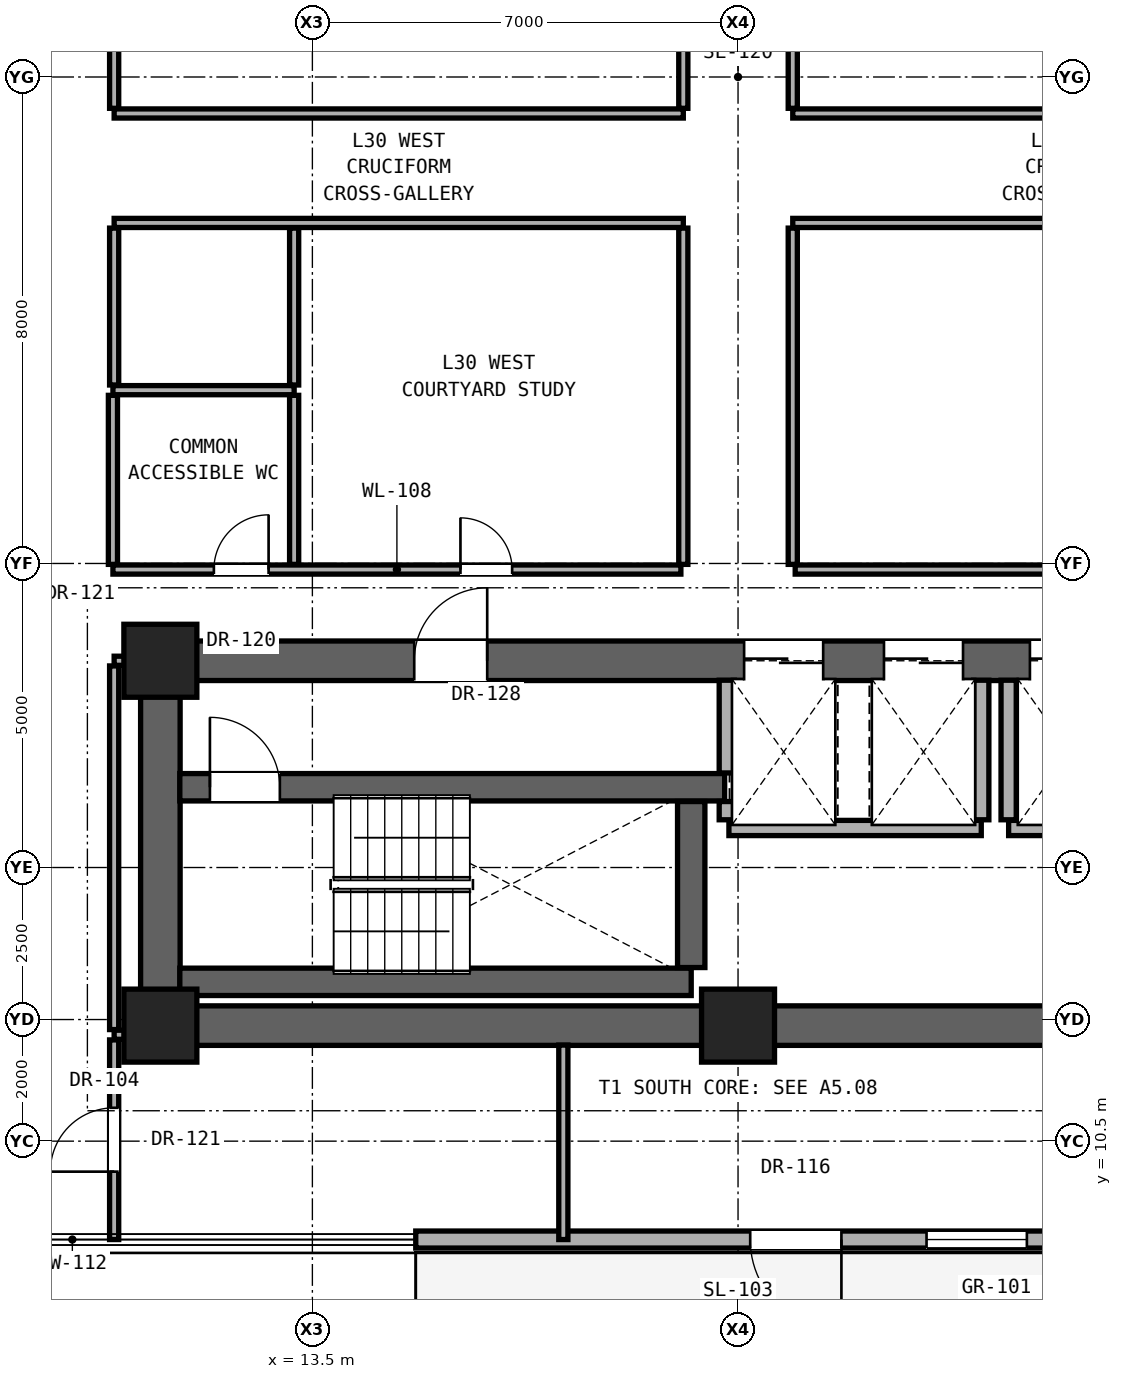
"""IFC4 building model, lengths in metres.
Left out: names, types, materials, properties, quantities, classifications, styles, units other than length and angle.
Written with IfcOpenShell. Run it as: python <this file> out.ifc"""

import sys

from ifc_helpers import new_model, si_unit, direction, frame, frame_2d, origin, origin_2d, place, context, subcontext, project, spatial, rectangle, extrude, element, fill, save


model = new_model("IFC4")
c1 = context("Model", 3, precision=1e-05, world=origin(), true_north=direction((0.0, 1.0)))
c2 = subcontext(c1, "Body", "Model", "MODEL_VIEW")
j1 = project(units=[si_unit("LENGTHUNIT", "METRE"), si_unit("PLANEANGLEUNIT", "RADIAN")], contexts=[c1])
p1 = place(None, origin())
s1 = spatial("IfcSite", under=j1, at=p1, CompositionType="ELEMENT")
p2 = place(p1, origin())
s2 = spatial("IfcBuilding", under=s1, at=p2, CompositionType="ELEMENT")
p3 = place(p2, frame((0.0, 0.0, 108.2)))
s3 = spatial("IfcBuildingStorey", under=s2, at=p3, CompositionType="ELEMENT", Elevation=108.2)
for number, where, z_axis, x_axis in (
    (1, (11.0, 12.4, 0.0), (0.0, 0.0, 1.0), (1.0, 0.0, 0.0)),
    (2, (20.5, 12.4, 0.0), (0.0, 0.0, 1.0), (1.0, 0.0, 0.0)),
    (3, (11.0, 18.4, 0.0), (0.0, 0.0, 1.0), (1.0, 0.0, 0.0)),
):
    element("IfcColumn", number, at=place(p3, frame(where, z_axis=z_axis, x_axis=x_axis)), inside=s3, PredefinedType="COLUMN", context=c2, shape_type="SweptSolid", body=[
        extrude(rectangle(XDim=1.2, YDim=1.2, at=origin_2d()), origin(), (0.0, 0.0, 1.0), 3.3),
    ])
p4 = place(p3, frame((11.0, 12.4, 0.0), z_axis=(0.0, 0.0, 1.0), x_axis=(1.0, 0.0, 0.0)))
e4 = element("IfcWall", 4, at=p4, inside=s3, PredefinedType="SHEAR", context=c2, shape_type="SweptSolid", body=[
    extrude(rectangle(XDim=19.0, YDim=0.65, at=frame_2d((9.5, 0.0))), origin(), (0.0, 0.0, 1.0), 3.08),
])
p5 = place(p3, frame((11.0, 12.4, 0.0), z_axis=(0.0, 0.0, 1.0), x_axis=(0.0, 1.0, 0.0)))
e5 = element("IfcWall", 5, at=p5, inside=s3, PredefinedType="SHEAR", context=c2, shape_type="SweptSolid", body=[
    extrude(rectangle(XDim=6.0, YDim=0.65, at=frame_2d((3.0, 0.0))), origin(), (0.0, 0.0, 1.0), 3.08),
])
p6 = place(p3, frame((11.0, 18.4, 0.0), z_axis=(0.0, 0.0, 1.0), x_axis=(1.0, 0.0, 0.0)))
e6 = element("IfcWall", 6, at=p6, inside=s3, PredefinedType="SHEAR", context=c2, shape_type="SweptSolid", body=[
    extrude(rectangle(XDim=19.0, YDim=0.65, at=frame_2d((9.5, 0.0))), origin(), (0.0, 0.0, 1.0), 3.08),
])
p7 = place(p6, frame((4.175, 0.0, 0.0)))
e7 = element("IfcOpeningElement", 7, at=p7, cuts=e6, PredefinedType="OPENING", context=c2, shape_type="SweptSolid", body=[
    extrude(rectangle(XDim=1.2, YDim=2.25, at=frame_2d((0.6, 1.125))), frame((0.0, 0.335, 0.0), z_axis=(0.0, -1.0, 0.0), x_axis=(1.0, 0.0, 0.0)), (0.0, 0.0, 1.0), 0.67),
])
p8 = place(p6, frame((9.6, 0.0, 0.0)))
e8 = element("IfcOpeningElement", 8, at=p8, cuts=e6, PredefinedType="OPENING", context=c2, shape_type="SweptSolid", body=[
    extrude(rectangle(XDim=1.3, YDim=2.3, at=frame_2d((0.65, 1.15))), frame((0.0, 0.335, 0.0), z_axis=(0.0, -1.0, 0.0), x_axis=(1.0, 0.0, 0.0)), (0.0, 0.0, 1.0), 0.67),
])
p9 = place(p6, frame((11.9, 0.0, 0.0)))
e9 = element("IfcOpeningElement", 9, at=p9, cuts=e6, PredefinedType="OPENING", context=c2, shape_type="SweptSolid", body=[
    extrude(rectangle(XDim=1.3, YDim=2.3, at=frame_2d((0.65, 1.15))), frame((0.0, 0.335, 0.0), z_axis=(0.0, -1.0, 0.0), x_axis=(1.0, 0.0, 0.0)), (0.0, 0.0, 1.0), 0.67),
])
p10 = place(p6, frame((14.3, 0.0, 0.0)))
e10 = element("IfcOpeningElement", 10, at=p10, cuts=e6, PredefinedType="OPENING", context=c2, shape_type="SweptSolid", body=[
    extrude(rectangle(XDim=1.3, YDim=2.3, at=frame_2d((0.65, 1.15))), frame((0.0, 0.335, 0.0), z_axis=(0.0, -1.0, 0.0), x_axis=(1.0, 0.0, 0.0)), (0.0, 0.0, 1.0), 0.67),
])
p11 = place(p6, frame((16.6, 0.0, 0.0)))
e11 = element("IfcOpeningElement", 11, at=p11, cuts=e6, PredefinedType="OPENING", context=c2, shape_type="SweptSolid", body=[
    extrude(rectangle(XDim=1.3, YDim=2.3, at=frame_2d((0.65, 1.15))), frame((0.0, 0.335, 0.0), z_axis=(0.0, -1.0, 0.0), x_axis=(1.0, 0.0, 0.0)), (0.0, 0.0, 1.0), 0.67),
])
p12 = place(p3, frame((25.8, 8.882, 0.0), z_axis=(0.0, 0.0, 1.0), x_axis=(-1.0, 0.0, 0.0)))
e12 = element("IfcWall", 12, at=p12, inside=s3, PredefinedType="SOLIDWALL", context=c2, shape_type="SweptSolid", body=[
    extrude(rectangle(XDim=10.6, YDim=0.28, at=frame_2d((5.3, 0.0))), origin(), (0.0, 0.0, 1.0), 3.04),
])
p13 = place(p12, frame((0.55, 0.0, 0.69)))
e13 = element("IfcOpeningElement", 13, at=p13, cuts=e12, PredefinedType="OPENING", context=c2, shape_type="SweptSolid", body=[
    extrude(rectangle(XDim=1.65, YDim=2.2, at=frame_2d((0.825, 1.1))), frame((0.0, 0.15, 0.0), z_axis=(0.0, -1.0, 0.0), x_axis=(1.0, 0.0, 0.0)), (0.0, 0.0, 1.0), 0.3),
])
p14 = place(p12, frame((3.6, 0.0, 0.0)))
e14 = element("IfcOpeningElement", 14, at=p14, cuts=e12, PredefinedType="OPENING", context=c2, shape_type="SweptSolid", body=[
    extrude(rectangle(XDim=1.5, YDim=2.3, at=frame_2d((0.75, 1.15))), frame((0.0, 0.15, 0.0), z_axis=(0.0, -1.0, 0.0), x_axis=(1.0, 0.0, 0.0)), (0.0, 0.0, 1.0), 0.3),
])
p15 = place(p3, frame((10.24, 12.25, 0.0), z_axis=(0.0, 0.0, 1.0), x_axis=(1.0, 0.0, 0.0)))
e15 = element("IfcWall", 15, at=p15, inside=s3, PredefinedType="PARTITIONING", context=c2, shape_type="SweptSolid", body=[
    extrude(rectangle(XDim=0.44, YDim=0.15, at=frame_2d((0.22, 0.0))), origin(), (0.0, 0.0, 1.0), 3.08),
])
p16 = place(p3, frame((11.32, 13.12, 0.0), z_axis=(0.0, 0.0, 1.0), x_axis=(1.0, 0.0, 0.0)))
e16 = element("IfcWall", 16, at=p16, inside=s3, PredefinedType="SHEAR", context=c2, shape_type="SweptSolid", body=[
    extrude(rectangle(XDim=8.41, YDim=0.45, at=frame_2d((4.205, 0.0))), origin(), (0.0, 0.0, 1.0), 3.08),
])
p17 = place(p3, frame((20.35, 15.65, 0.0), z_axis=(0.0, 0.0, 1.0), x_axis=(1.0, 0.0, 0.0)))
e17 = element("IfcWall", 17, at=p17, inside=s3, PredefinedType="SOLIDWALL", context=c2, shape_type="SweptSolid", body=[
    extrude(rectangle(XDim=4.15, YDim=0.25, at=frame_2d((2.075, 0.0))), origin(), (0.0, 0.0, 1.0), 3.08),
])
p18 = place(p3, frame((24.95, 15.65, 0.0), z_axis=(0.0, 0.0, 1.0), x_axis=(1.0, 0.0, 0.0)))
e18 = element("IfcWall", 18, at=p18, inside=s3, PredefinedType="SOLIDWALL", context=c2, shape_type="SweptSolid", body=[
    extrude(rectangle(XDim=4.25, YDim=0.25, at=frame_2d((2.125, 0.0))), origin(), (0.0, 0.0, 1.0), 3.08),
])
p19 = place(p3, frame((11.32, 16.32, 0.0), z_axis=(0.0, 0.0, 1.0), x_axis=(1.0, 0.0, 0.0)))
e19 = element("IfcWall", 19, at=p19, inside=s3, PredefinedType="SHEAR", context=c2, shape_type="SweptSolid", body=[
    extrude(rectangle(XDim=8.96, YDim=0.45, at=frame_2d((4.48, 0.0))), origin(), (0.0, 0.0, 1.0), 3.08),
])
p20 = place(p19, frame((0.495, 0.0, 0.0)))
e20 = element("IfcOpeningElement", 20, at=p20, cuts=e19, PredefinedType="OPENING", context=c2, shape_type="SweptSolid", body=[
    extrude(rectangle(XDim=1.15, YDim=2.2, at=frame_2d((0.575, 1.1))), frame((0.0, 0.235, 0.0), z_axis=(0.0, -1.0, 0.0), x_axis=(1.0, 0.0, 0.0)), (0.0, 0.0, 1.0), 0.47),
])
p21 = place(p3, frame((10.24, 18.4, 0.0), z_axis=(0.0, 0.0, 1.0), x_axis=(1.0, 0.0, 0.0)))
e21 = element("IfcWall", 21, at=p21, inside=s3, PredefinedType="PARTITIONING", context=c2, shape_type="SweptSolid", body=[
    extrude(rectangle(XDim=0.44, YDim=0.15, at=frame_2d((0.22, 0.0))), origin(), (0.0, 0.0, 1.0), 2.456),
])
p22 = place(p3, frame((10.22, 19.9, 0.0), z_axis=(0.0, 0.0, 1.0), x_axis=(1.0, 0.0, 0.0)))
e22 = element("IfcWall", 22, at=p22, inside=s3, PredefinedType="PARTITIONING", context=c2, shape_type="SweptSolid", body=[
    extrude(rectangle(XDim=9.34, YDim=0.15, at=frame_2d((4.67, 0.0))), origin(), (0.0, 0.0, 1.0), 2.124),
])
p23 = place(p22, frame((1.66, 0.0, 0.0)))
e23 = element("IfcOpeningElement", 23, at=p23, cuts=e22, PredefinedType="OPENING", context=c2, shape_type="SweptSolid", body=[
    extrude(rectangle(XDim=0.9, YDim=2.1, at=frame_2d((0.45, 1.05))), frame((0.0, 0.085, 0.0), z_axis=(0.0, -1.0, 0.0), x_axis=(1.0, 0.0, 0.0)), (0.0, 0.0, 1.0), 0.17),
])
p24 = place(p22, frame((5.715, 0.0, 0.0)))
e24 = element("IfcOpeningElement", 24, at=p24, cuts=e22, PredefinedType="OPENING", context=c2, shape_type="SweptSolid", body=[
    extrude(rectangle(XDim=0.85, YDim=2.01, at=frame_2d((0.425, 1.005))), frame((0.0, 0.085, 0.0), z_axis=(0.0, -1.0, 0.0), x_axis=(1.0, 0.0, 0.0)), (0.0, 0.0, 1.0), 0.17),
])
p25 = place(p3, frame((21.44, 19.9, 0.0), z_axis=(0.0, 0.0, 1.0), x_axis=(1.0, 0.0, 0.0)))
e25 = element("IfcWall", 25, at=p25, inside=s3, PredefinedType="PARTITIONING", context=c2, shape_type="SweptSolid", body=[
    extrude(rectangle(XDim=9.32, YDim=0.15, at=frame_2d((4.66, 0.0))), origin(), (0.0, 0.0, 1.0), 2.124),
])
p26 = place(p25, frame((4.235, 0.0, 0.0)))
e26 = element("IfcOpeningElement", 26, at=p26, cuts=e25, PredefinedType="OPENING", context=c2, shape_type="SweptSolid", body=[
    extrude(rectangle(XDim=0.85, YDim=2.01, at=frame_2d((0.425, 1.005))), frame((0.0, 0.085, 0.0), z_axis=(0.0, -1.0, 0.0), x_axis=(1.0, 0.0, 0.0)), (0.0, 0.0, 1.0), 0.17),
])
p27 = place(p3, frame((10.22, 22.85, 0.0), z_axis=(0.0, 0.0, 1.0), x_axis=(1.0, 0.0, 0.0)))
e27 = element("IfcWall", 27, at=p27, inside=s3, PredefinedType="PARTITIONING", context=c2, shape_type="SweptSolid", body=[
    extrude(rectangle(XDim=2.98, YDim=0.15, at=frame_2d((1.49, 0.0))), origin(), (0.0, 0.0, 1.0), 2.124),
])
for number, where, z_axis, x_axis in (
    (28, (10.24, 25.6, 0.0), (0.0, 0.0, 1.0), (1.0, 0.0, 0.0)),
    (29, (21.4, 25.6, 0.0), (0.0, 0.0, 1.0), (1.0, 0.0, 0.0)),
    (30, (10.24, 27.4, 0.0), (0.0, 0.0, 1.0), (1.0, 0.0, 0.0)),
    (31, (21.4, 27.4, 0.0), (0.0, 0.0, 1.0), (1.0, 0.0, 0.0)),
):
    element("IfcWall", number, at=place(p3, frame(where, z_axis=z_axis, x_axis=x_axis)), inside=s3, PredefinedType="PARTITIONING", context=c2, shape_type="SweptSolid", body=[
        extrude(rectangle(XDim=9.36, YDim=0.15, at=frame_2d((4.68, 0.0))), origin(), (0.0, 0.0, 1.0), 2.124),
    ])
p28 = place(p3, frame((10.22, 19.985, 0.0), z_axis=(0.0, 0.0, 1.0), x_axis=(0.0, 1.0, 0.0)))
e32 = element("IfcWall", 32, at=p28, inside=s3, PredefinedType="PARTITIONING", context=c2, shape_type="SweptSolid", body=[
    extrude(rectangle(XDim=2.78, YDim=0.15, at=frame_2d((1.39, 0.0))), origin(), (0.0, 0.0, 1.0), 3.08),
])
p29 = place(p3, frame((10.24, 8.882, 0.0), z_axis=(0.0, 0.0, 1.0), x_axis=(0.0, 1.0, 0.0)))
e33 = element("IfcWall", 33, at=p29, inside=s3, PredefinedType="PARTITIONING", context=c2, shape_type="SweptSolid", body=[
    extrude(rectangle(XDim=3.283, YDim=0.15, at=frame_2d((1.642, 0.0))), origin(), (0.0, 0.0, 1.0), 3.08),
])
p30 = place(p29, frame((1.116, 0.0, 0.0)))
e34 = element("IfcOpeningElement", 34, at=p30, cuts=e33, PredefinedType="OPENING", context=c2, shape_type="SweptSolid", body=[
    extrude(rectangle(XDim=1.05, YDim=2.2, at=frame_2d((0.525, 1.1))), frame((0.0, 0.085, 0.0), z_axis=(0.0, -1.0, 0.0), x_axis=(1.0, 0.0, 0.0)), (0.0, 0.0, 1.0), 0.17),
])
p31 = place(p3, frame((10.24, 12.335, 0.0), z_axis=(0.0, 0.0, 1.0), x_axis=(0.0, 1.0, 0.0)))
e35 = element("IfcWall", 35, at=p31, inside=s3, PredefinedType="PARTITIONING", context=c2, shape_type="SweptSolid", body=[
    extrude(rectangle(XDim=5.98, YDim=0.15, at=frame_2d((2.99, 0.0))), origin(), (0.0, 0.0, 1.0), 2.456),
])
p32 = place(p3, frame((10.24, 22.935, 0.0), z_axis=(0.0, 0.0, 1.0), x_axis=(0.0, 1.0, 0.0)))
e36 = element("IfcWall", 36, at=p32, inside=s3, PredefinedType="PARTITIONING", context=c2, shape_type="SweptSolid", body=[
    extrude(rectangle(XDim=2.58, YDim=0.15, at=frame_2d((1.29, 0.0))), origin(), (0.0, 0.0, 1.0), 2.299),
])
p33 = place(p3, frame((10.24, 27.485, 0.0), z_axis=(0.0, 0.0, 1.0), x_axis=(0.0, 1.0, 0.0)))
e37 = element("IfcWall", 37, at=p33, inside=s3, PredefinedType="PARTITIONING", context=c2, shape_type="SweptSolid", body=[
    extrude(rectangle(XDim=5.53, YDim=0.15, at=frame_2d((2.765, 0.0))), origin(), (0.0, 0.0, 1.0), 2.299),
])
p34 = place(p33, frame((2.29, 0.0, 0.0)))
e38 = element("IfcOpeningElement", 38, at=p34, cuts=e37, PredefinedType="OPENING", context=c2, shape_type="SweptSolid", body=[
    extrude(rectangle(XDim=0.95, YDim=2.15, at=frame_2d((0.475, 1.075))), frame((0.0, 0.085, 0.0), z_axis=(0.0, -1.0, 0.0), x_axis=(1.0, 0.0, 0.0)), (0.0, 0.0, 1.0), 0.17),
])
p35 = place(p3, frame((13.2, 19.985, 0.0), z_axis=(0.0, 0.0, 1.0), x_axis=(0.0, 1.0, 0.0)))
e39 = element("IfcWall", 39, at=p35, inside=s3, PredefinedType="PARTITIONING", context=c2, shape_type="SweptSolid", body=[
    extrude(rectangle(XDim=2.78, YDim=0.15, at=frame_2d((1.39, 0.0))), origin(), (0.0, 0.0, 1.0), 3.08),
])
p36 = place(p3, frame((13.2, 22.935, 0.0), z_axis=(0.0, 0.0, 1.0), x_axis=(0.0, 1.0, 0.0)))
e40 = element("IfcWall", 40, at=p36, inside=s3, PredefinedType="PARTITIONING", context=c2, shape_type="SweptSolid", body=[
    extrude(rectangle(XDim=2.58, YDim=0.15, at=frame_2d((1.29, 0.0))), origin(), (0.0, 0.0, 1.0), 2.124),
])
p37 = place(p3, frame((17.627, 8.882, 0.0), z_axis=(0.0, 0.0, 1.0), x_axis=(0.0, 1.0, 0.0)))
e41 = element("IfcWall", 41, at=p37, inside=s3, PredefinedType="PARTITIONING", context=c2, shape_type="SweptSolid", body=[
    extrude(rectangle(XDim=3.198, YDim=0.15, at=frame_2d((1.599, 0.0))), origin(), (0.0, 0.0, 1.0), 3.08),
])
for number, where, z_axis, x_axis in (
    (42, (19.6, 19.985, 0.0), (0.0, 0.0, 1.0), (0.0, 1.0, 0.0)),
    (43, (19.6, 27.485, 0.0), (0.0, 0.0, 1.0), (0.0, 1.0, 0.0)),
):
    element("IfcWall", number, at=place(p3, frame(where, z_axis=z_axis, x_axis=x_axis)), inside=s3, PredefinedType="PARTITIONING", context=c2, shape_type="SweptSolid", body=[
        extrude(rectangle(XDim=5.53, YDim=0.15, at=frame_2d((2.765, 0.0))), origin(), (0.0, 0.0, 1.0), 2.124),
    ])
p38 = place(p3, frame((19.73, 13.355, 0.0), z_axis=(0.0, 0.0, 1.0), x_axis=(0.0, 1.0, 0.0)))
e44 = element("IfcWall", 44, at=p38, inside=s3, PredefinedType="SHEAR", context=c2, shape_type="SweptSolid", body=[
    extrude(rectangle(XDim=2.73, YDim=0.45, at=frame_2d((1.365, 0.0))), origin(), (0.0, 0.0, 1.0), 3.08),
])
p39 = place(p3, frame((20.315, 15.785, 0.0), z_axis=(0.0, 0.0, 1.0), x_axis=(0.0, 1.0, 0.0)))
e45 = element("IfcWall", 45, at=p39, inside=s3, PredefinedType="SOLIDWALL", context=c2, shape_type="SweptSolid", body=[
    extrude(rectangle(XDim=0.3, YDim=0.25, at=frame_2d((0.15, 0.0))), origin(), (0.0, 0.0, 1.0), 3.08),
])
p40 = place(p3, frame((20.315, 16.555, 0.0), z_axis=(0.0, 0.0, 1.0), x_axis=(0.0, 1.0, 0.0)))
e46 = element("IfcWall", 46, at=p40, inside=s3, PredefinedType="SOLIDWALL", context=c2, shape_type="SweptSolid", body=[
    extrude(rectangle(XDim=1.525, YDim=0.25, at=frame_2d((0.763, 0.0))), origin(), (0.0, 0.0, 1.0), 3.08),
])
for number, where, z_axis, x_axis in (
    (47, (21.4, 19.985, 0.0), (0.0, 0.0, 1.0), (0.0, 1.0, 0.0)),
    (48, (21.4, 27.485, 0.0), (0.0, 0.0, 1.0), (0.0, 1.0, 0.0)),
):
    element("IfcWall", number, at=place(p3, frame(where, z_axis=z_axis, x_axis=x_axis)), inside=s3, PredefinedType="PARTITIONING", context=c2, shape_type="SweptSolid", body=[
        extrude(rectangle(XDim=5.53, YDim=0.15, at=frame_2d((2.765, 0.0))), origin(), (0.0, 0.0, 1.0), 2.124),
    ])
for number, where, z_axis, x_axis in (
    (49, (24.5, 15.785, 0.0), (0.0, 0.0, 1.0), (0.0, 1.0, 0.0)),
    (50, (24.95, 15.785, 0.0), (0.0, 0.0, 1.0), (0.0, 1.0, 0.0)),
):
    element("IfcWall", number, at=place(p3, frame(where, z_axis=z_axis, x_axis=x_axis)), inside=s3, PredefinedType="SOLIDWALL", context=c2, shape_type="SweptSolid", body=[
        extrude(rectangle(XDim=2.295, YDim=0.25, at=frame_2d((1.147, 0.0))), origin(), (0.0, 0.0, 1.0), 3.08),
    ])
p41 = place(p13, origin())
e51 = element("IfcWindow", 51, at=p41, inside=s3, PartitioningType="SINGLE_PANEL", PredefinedType="WINDOW", context=c2, shape_type="SweptSolid", body=[
    extrude(rectangle(XDim=1.65, YDim=2.2, at=frame_2d((0.825, 1.1))), frame((0.0, 0.03, 0.0), z_axis=(0.0, -1.0, 0.0), x_axis=(1.0, 0.0, 0.0)), (0.0, 0.0, 1.0), 0.06),
])
fill(e13, e51)
p42 = place(p14, origin())
e52 = element("IfcDoor", 52, at=p42, inside=s3, OperationType="SINGLE_SWING_LEFT", PredefinedType="DOOR", context=c2, shape_type="SweptSolid", body=[
    extrude(rectangle(XDim=1.5, YDim=2.3, at=frame_2d((0.75, 1.15))), frame((0.0, 0.025, 0.0), z_axis=(0.0, -1.0, 0.0), x_axis=(1.0, 0.0, 0.0)), (0.0, 0.0, 1.0), 0.05),
])
fill(e14, e52)
p43 = place(p7, origin())
e53 = element("IfcDoor", 53, at=p43, inside=s3, OperationType="SINGLE_SWING_RIGHT", PredefinedType="DOOR", context=c2, shape_type="SweptSolid", body=[
    extrude(rectangle(XDim=1.2, YDim=2.25, at=frame_2d((0.6, 1.125))), frame((0.0, 0.025, 0.0), z_axis=(0.0, -1.0, 0.0), x_axis=(1.0, 0.0, 0.0)), (0.0, 0.0, 1.0), 0.05),
])
fill(e7, e53)
p44 = place(p20, origin())
e54 = element("IfcDoor", 54, at=p44, inside=s3, OperationType="SINGLE_SWING_LEFT", PredefinedType="DOOR", context=c2, shape_type="SweptSolid", body=[
    extrude(rectangle(XDim=1.15, YDim=2.2, at=frame_2d((0.575, 1.1))), frame((0.0, 0.025, 0.0), z_axis=(0.0, -1.0, 0.0), x_axis=(1.0, 0.0, 0.0)), (0.0, 0.0, 1.0), 0.05),
])
fill(e20, e54)
p45 = place(p23, origin())
e55 = element("IfcDoor", 55, at=p45, inside=s3, OperationType="SINGLE_SWING_RIGHT", PredefinedType="DOOR", context=c2, shape_type="SweptSolid", body=[
    extrude(rectangle(XDim=0.9, YDim=2.1, at=frame_2d((0.45, 1.05))), frame((0.0, 0.025, 0.0), z_axis=(0.0, -1.0, 0.0), x_axis=(1.0, 0.0, 0.0)), (0.0, 0.0, 1.0), 0.05),
])
fill(e23, e55)
p46 = place(p24, origin())
e56 = element("IfcDoor", 56, at=p46, inside=s3, OperationType="SINGLE_SWING_LEFT", PredefinedType="DOOR", context=c2, shape_type="SweptSolid", body=[
    extrude(rectangle(XDim=0.85, YDim=2.01, at=frame_2d((0.425, 1.005))), frame((0.0, 0.025, 0.0), z_axis=(0.0, -1.0, 0.0), x_axis=(1.0, 0.0, 0.0)), (0.0, 0.0, 1.0), 0.05),
])
fill(e24, e56)
p47 = place(p30, origin())
e57 = element("IfcDoor", 57, at=p47, inside=s3, OperationType="SINGLE_SWING_LEFT", PredefinedType="DOOR", context=c2, shape_type="SweptSolid", body=[
    extrude(rectangle(XDim=1.05, YDim=2.2, at=frame_2d((0.525, 1.1))), frame((0.0, 0.025, 0.0), z_axis=(0.0, -1.0, 0.0), x_axis=(1.0, 0.0, 0.0)), (0.0, 0.0, 1.0), 0.05),
])
fill(e34, e57)
p48 = place(p8, origin())
e58 = element("IfcDoor", 58, at=p48, inside=s3, OperationType="DOUBLE_DOOR_SLIDING", PredefinedType="DOOR", context=c2, shape_type="SweptSolid", body=[
    extrude(rectangle(XDim=1.3, YDim=2.3, at=frame_2d((0.65, 1.15))), frame((0.0, 0.025, 0.0), z_axis=(0.0, -1.0, 0.0), x_axis=(1.0, 0.0, 0.0)), (0.0, 0.0, 1.0), 0.05),
])
fill(e8, e58)
p49 = place(p9, origin())
e59 = element("IfcDoor", 59, at=p49, inside=s3, OperationType="DOUBLE_DOOR_SLIDING", PredefinedType="DOOR", context=c2, shape_type="SweptSolid", body=[
    extrude(rectangle(XDim=1.3, YDim=2.3, at=frame_2d((0.65, 1.15))), frame((0.0, 0.025, 0.0), z_axis=(0.0, -1.0, 0.0), x_axis=(1.0, 0.0, 0.0)), (0.0, 0.0, 1.0), 0.05),
])
fill(e9, e59)
p50 = place(p10, origin())
e60 = element("IfcDoor", 60, at=p50, inside=s3, OperationType="DOUBLE_DOOR_SLIDING", PredefinedType="DOOR", context=c2, shape_type="SweptSolid", body=[
    extrude(rectangle(XDim=1.3, YDim=2.3, at=frame_2d((0.65, 1.15))), frame((0.0, 0.025, 0.0), z_axis=(0.0, -1.0, 0.0), x_axis=(1.0, 0.0, 0.0)), (0.0, 0.0, 1.0), 0.05),
])
fill(e10, e60)
save(model, sys.argv[1])
